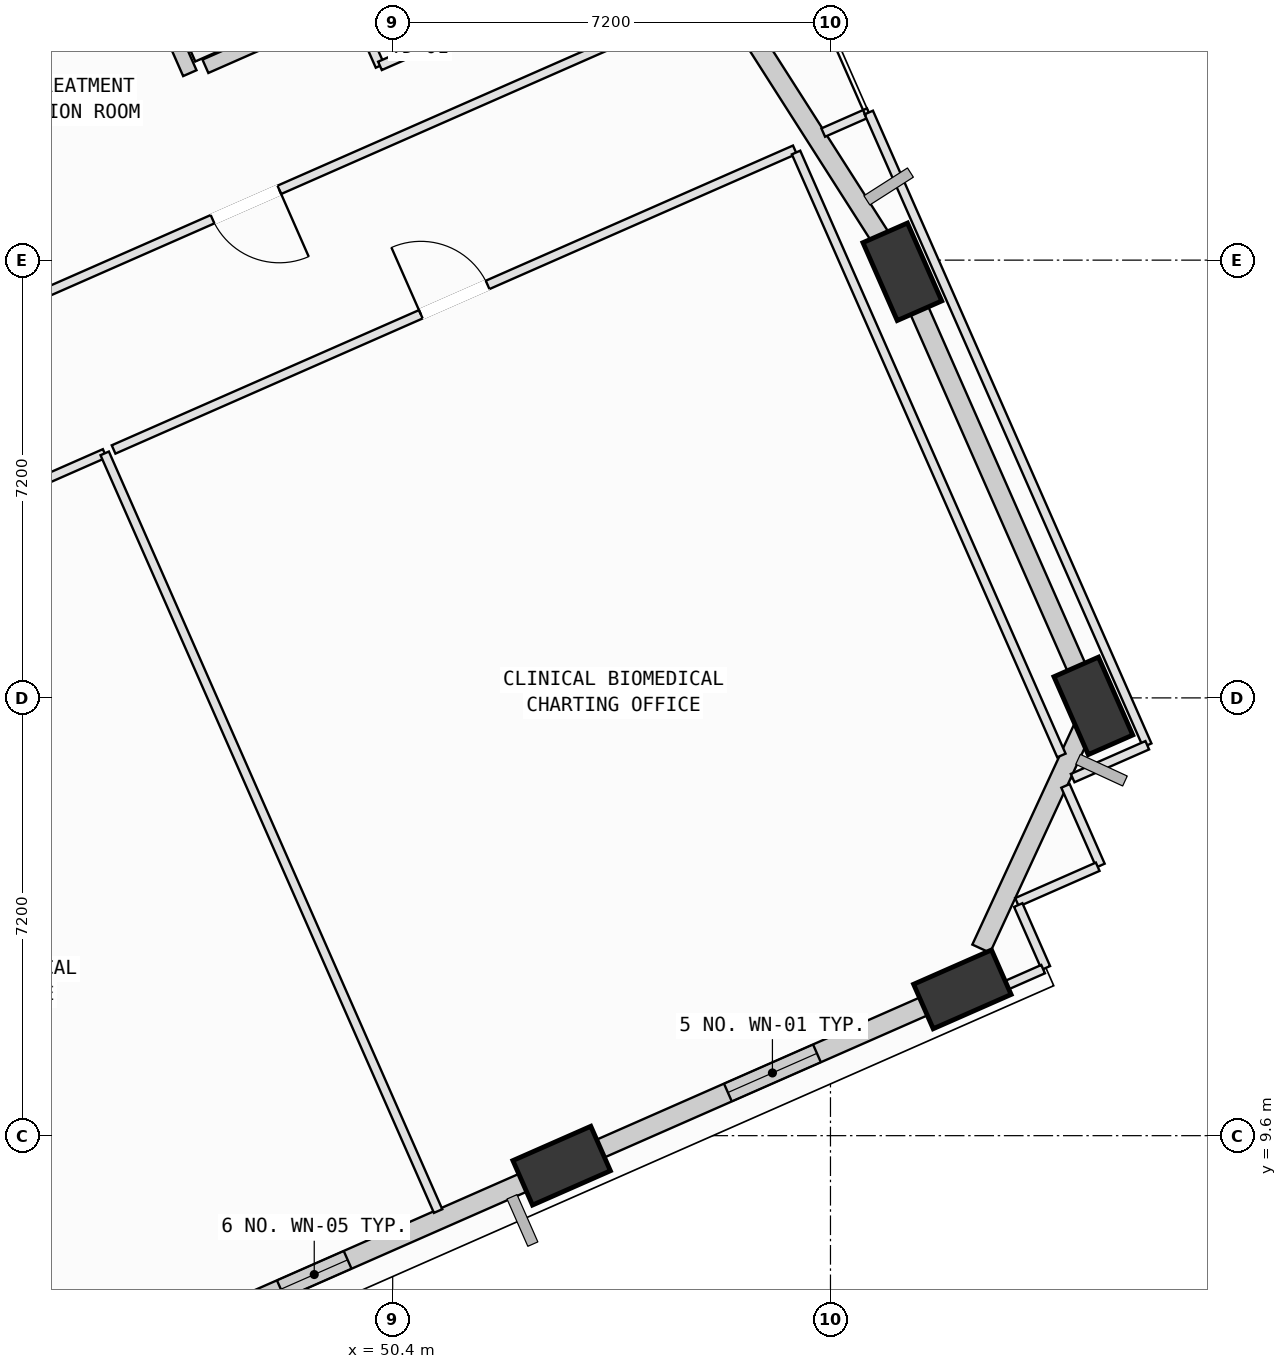
"""IFC4 building model, lengths in metres.
Left out: names, types, materials, properties, quantities, classifications, styles, units other than length and angle.
Written with IfcOpenShell. Run it as: python <this file> out.ifc"""

import sys

from ifc_helpers import new_model, si_unit, direction, frame, frame_2d, origin, origin_2d, place, context, subcontext, project, spatial, rectangle, extrude, element, fill, save


model = new_model("IFC4")
c1 = context("Model", 3, precision=1e-05, world=origin(), true_north=direction((0.0, 1.0)))
c2 = subcontext(c1, "Body", "Model", "MODEL_VIEW")
j1 = project(units=[si_unit("LENGTHUNIT", "METRE"), si_unit("PLANEANGLEUNIT", "RADIAN")], contexts=[c1])
p1 = place(None, origin())
s1 = spatial("IfcSite", under=j1, at=p1, CompositionType="ELEMENT")
p2 = place(p1, origin())
s2 = spatial("IfcBuilding", under=s1, at=p2, CompositionType="ELEMENT")
p3 = place(p2, frame((0.0, 0.0, 124.4)))
s3 = spatial("IfcBuildingStorey", under=s2, at=p3, CompositionType="ELEMENT", Elevation=124.4)
p4 = place(p3, frame((46.589, 6.207, 0.002), z_axis=(0.076271906054, 0.054254019298, 0.995609912434), x_axis=(-0.857296932846, 0.513440266916, 0.037696965954)))
e1 = element("IfcColumn", 1, at=p4, inside=s3, PredefinedType="COLUMN", context=c2, shape_type="SweptSolid", body=[
    extrude(rectangle(XDim=1.4, YDim=0.8, at=origin_2d()), origin(), (0.0, 0.0, 1.0), 4.014),
])
p5 = place(p3, frame((53.179, 9.106, 0.002), z_axis=(0.063984022053, 0.081240871306, 0.994638610628), x_axis=(-0.966927732484, 0.251626976768, 0.041648826096)))
e2 = element("IfcColumn", 2, at=p5, inside=s3, PredefinedType="COLUMN", context=c2, shape_type="SweptSolid", body=[
    extrude(rectangle(XDim=1.4, YDim=0.8, at=origin_2d()), origin(), (0.0, 0.0, 1.0), 4.018),
])
p6 = place(p3, frame((59.769, 12.006, 0.002), z_axis=(0.051734907432, 0.108139906156, 0.992788628082), x_axis=(-0.998243901982, 0.0343235746, 0.048280476198)))
e3 = element("IfcColumn", 3, at=p6, inside=s3, PredefinedType="COLUMN", context=c2, shape_type="SweptSolid", body=[
    extrude(rectangle(XDim=1.4, YDim=0.8, at=origin_2d()), origin(), (0.0, 0.0, 1.0), 4.025),
])
p7 = place(p3, frame((61.924, 16.669, 0.002), z_axis=(0.032503072865, 0.116853398154, 0.992617163661), x_axis=(0.144542702737, -0.983250966895, 0.111017760678)))
e4 = element("IfcColumn", 4, at=p7, inside=s3, PredefinedType="COLUMN", context=c2, shape_type="SweptSolid", body=[
    extrude(rectangle(XDim=1.4, YDim=0.8, at=origin_2d()), origin(), (0.0, 0.0, 1.0), 4.026),
])
p8 = place(p3, frame((58.782, 23.808, 0.002), z_axis=(0.003220286845, 0.103899820854, 0.99458255413), x_axis=(0.374351311084, -0.922392684735, 0.095146366388)))
e5 = element("IfcColumn", 5, at=p8, inside=s3, PredefinedType="COLUMN", context=c2, shape_type="SweptSolid", body=[
    extrude(rectangle(XDim=1.4, YDim=0.8, at=origin_2d()), origin(), (0.0, 0.0, 1.0), 4.018),
])
p9 = place(p3, frame((47.32, 27.188, 0.0), z_axis=(0.0, 0.0, 1.0), x_axis=(0.915306756623, 0.402757422378, 0.0)))
e6 = element("IfcWall", 6, at=p9, inside=s3, PredefinedType="SOLIDWALL", context=c2, shape_type="SweptSolid", body=[
    extrude(rectangle(XDim=6.96, YDim=0.24, at=frame_2d((3.48, 0.0))), origin(), (0.0, 0.0, 1.0), 2.945),
])
p10 = place(p9, frame((2.93, 0.0, 0.0)))
e7 = element("IfcOpeningElement", 7, at=p10, cuts=e6, PredefinedType="OPENING", context=c2, shape_type="SweptSolid", body=[
    extrude(rectangle(XDim=1.1, YDim=2.15, at=frame_2d((0.55, 1.075))), frame((0.0, 0.13, 0.0), z_axis=(0.0, -1.0, 0.0), x_axis=(1.0, 0.0, 0.0)), (0.0, 0.0, 1.0), 0.26),
])
p11 = place(p3, frame((46.057, 29.364, 0.0), z_axis=(0.0, 0.0, 1.0), x_axis=(0.402810607767, -0.915283351903, 0.0)))
e8 = element("IfcWall", 8, at=p11, inside=s3, PredefinedType="SOLIDWALL", context=c2, shape_type="SweptSolid", body=[
    extrude(rectangle(XDim=2.5, YDim=0.24, at=frame_2d((1.25, 0.0))), origin(), (0.0, 0.0, 1.0), 3.165),
])
p12 = place(p3, frame((52.902, 8.984, 0.0), z_axis=(0.0, 0.0, 1.0), x_axis=(-0.915310979882, -0.40274782446, 0.0)))
e9 = element("IfcWall", 9, at=p12, inside=s3, PredefinedType="SOLIDWALL", context=c2, shape_type="SweptSolid", body=[
    extrude(rectangle(XDim=6.218, YDim=0.32, at=frame_2d((3.109, 0.0))), origin(), (0.0, 0.0, 1.0), 3.165),
])
p13 = place(p12, frame((3.542, 0.0, 0.75)))
e10 = element("IfcOpeningElement", 10, at=p13, cuts=e9, PredefinedType="OPENING", context=c2, shape_type="SweptSolid", body=[
    extrude(rectangle(XDim=1.2, YDim=1.75, at=frame_2d((0.6, 0.875))), frame((0.0, 0.17, 0.0), z_axis=(0.0, -1.0, 0.0), x_axis=(1.0, 0.0, 0.0)), (0.0, 0.0, 1.0), 0.34),
])
p14 = place(p3, frame((59.506, 11.89, 0.0), z_axis=(0.0, 0.0, 1.0), x_axis=(-0.915325989122, -0.402713711758, 0.0)))
e11 = element("IfcWall", 11, at=p14, inside=s3, PredefinedType="SOLIDWALL", context=c2, shape_type="SweptSolid", body=[
    extrude(rectangle(XDim=6.242, YDim=0.32, at=frame_2d((3.121, 0.0))), origin(), (0.0, 0.0, 1.0), 3.165),
])
p15 = place(p14, frame((2.325, 0.0, 0.75)))
e12 = element("IfcOpeningElement", 12, at=p15, cuts=e11, PredefinedType="OPENING", context=c2, shape_type="SweptSolid", body=[
    extrude(rectangle(XDim=1.6, YDim=1.95, at=frame_2d((0.8, 0.975))), frame((0.0, 0.17, 0.0), z_axis=(0.0, -1.0, 0.0), x_axis=(1.0, 0.0, 0.0)), (0.0, 0.0, 1.0), 0.34),
])
p16 = place(p3, frame((61.817, 16.438, 0.0), z_axis=(0.0, 0.0, 1.0), x_axis=(-0.419461505916, -0.907773124219, 0.0)))
e13 = element("IfcWall", 13, at=p16, inside=s3, PredefinedType="SOLIDWALL", context=c2, shape_type="SweptSolid", body=[
    extrude(rectangle(XDim=4.145, YDim=0.32, at=frame_2d((2.073, 0.0))), origin(), (0.0, 0.0, 1.0), 3.165),
])
p17 = place(p3, frame((58.903, 23.534, 0.0), z_axis=(0.0, 0.0, 1.0), x_axis=(0.402727848823, -0.915319769142, 0.0)))
e14 = element("IfcWall", 14, at=p17, inside=s3, PredefinedType="SOLIDWALL", context=c2, shape_type="SweptSolid", body=[
    extrude(rectangle(XDim=6.84, YDim=0.32, at=frame_2d((3.42, 0.0))), origin(), (0.0, 0.0, 1.0), 3.165),
])
p18 = place(p3, frame((53.676, 31.81, 0.0), z_axis=(0.0, 0.0, 1.0), x_axis=(0.537911832646, -0.84300110338, 0.0)))
e15 = element("IfcWall", 15, at=p18, inside=s3, PredefinedType="SOLIDWALL", context=c2, shape_type="SweptSolid", body=[
    extrude(rectangle(XDim=8.838, YDim=0.32, at=frame_2d((4.419, 0.0))), origin(), (0.0, 0.0, 1.0), 3.165),
])
p19 = place(p3, frame((41.56, 26.828, 0.0), z_axis=(0.0, 0.0, 1.0), x_axis=(0.915304479766, 0.402762596726, 0.0)))
e16 = element("IfcWall", 16, at=p19, inside=s3, PredefinedType="SOLIDWALL", context=c2, shape_type="SweptSolid", body=[
    extrude(rectangle(XDim=5.117, YDim=0.32, at=frame_2d((2.559, 0.0))), origin(), (0.0, 0.0, 1.0), 3.145),
])
p20 = place(p19, frame((2.034, 0.0, 0.75)))
e17 = element("IfcOpeningElement", 17, at=p20, cuts=e16, PredefinedType="OPENING", context=c2, shape_type="SweptSolid", body=[
    extrude(rectangle(XDim=1.2, YDim=1.75, at=frame_2d((0.6, 0.875))), frame((0.0, 0.17, 0.0), z_axis=(0.0, -1.0, 0.0), x_axis=(1.0, 0.0, 0.0)), (0.0, 0.0, 1.0), 0.34),
])
p21 = place(p3, frame((36.5, 16.79, 0.0), z_axis=(0.0, 0.0, 1.0), x_axis=(0.915322583173, 0.402721453034, 0.0)))
e18 = element("IfcWall", 18, at=p21, inside=s3, PredefinedType="PARTITIONING", context=c2, shape_type="SweptSolid", body=[
    extrude(rectangle(XDim=10.012, YDim=0.15, at=frame_2d((5.006, 0.0))), origin(), (0.0, 0.0, 1.0), 2.965),
])
p22 = place(p21, frame((4.406, 0.0, 0.0)))
e19 = element("IfcOpeningElement", 19, at=p22, cuts=e18, PredefinedType="OPENING", context=c2, shape_type="SweptSolid", body=[
    extrude(rectangle(XDim=1.2, YDim=2.15, at=frame_2d((0.6, 1.075))), frame((0.0, 0.085, 0.0), z_axis=(0.0, -1.0, 0.0), x_axis=(1.0, 0.0, 0.0)), (0.0, 0.0, 1.0), 0.17),
])
p23 = place(p3, frame((45.664, 20.822, 0.0), z_axis=(0.0, 0.0, 1.0), x_axis=(0.402718182195, -0.915324022262, 0.0)))
e20 = element("IfcWall", 20, at=p23, inside=s3, PredefinedType="PARTITIONING", context=c2, shape_type="SweptSolid", body=[
    extrude(rectangle(XDim=13.615, YDim=0.15, at=frame_2d((6.807, 0.0))), origin(), (0.0, 0.0, 1.0), 3.78),
])
p24 = place(p3, frame((45.81, 20.886, 0.0), z_axis=(0.0, 0.0, 1.0), x_axis=(0.915307973906, 0.402754655969, 0.0)))
e21 = element("IfcWall", 21, at=p24, inside=s3, PredefinedType="PARTITIONING", context=c2, shape_type="SweptSolid", body=[
    extrude(rectangle(XDim=12.24, YDim=0.15, at=frame_2d((6.12, 0.0))), origin(), (0.0, 0.0, 1.0), 3.78),
])
p25 = place(p24, frame((5.52, 0.0, 0.0)))
e22 = element("IfcOpeningElement", 22, at=p25, cuts=e21, PredefinedType="OPENING", context=c2, shape_type="SweptSolid", body=[
    extrude(rectangle(XDim=1.2, YDim=2.15, at=frame_2d((0.6, 1.075))), frame((0.0, 0.085, 0.0), z_axis=(0.0, -1.0, 0.0), x_axis=(1.0, 0.0, 0.0)), (0.0, 0.0, 1.0), 0.17),
])
p26 = place(p3, frame((57.034, 25.77, 0.0), z_axis=(0.0, 0.0, 1.0), x_axis=(0.402780146141, -0.915296757273, 0.0)))
e23 = element("IfcWall", 23, at=p26, inside=s3, PredefinedType="PARTITIONING", context=c2, shape_type="SweptSolid", body=[
    extrude(rectangle(XDim=10.835, YDim=0.15, at=frame_2d((5.417, 0.0))), origin(), (0.0, 0.0, 1.0), 3.78),
])
p27 = place(p3, frame((61.465, 15.353, 0.0), z_axis=(0.0, 0.0, 1.0), x_axis=(0.402447017593, -0.915443279527, 0.0)))
e24 = element("IfcWall", 24, at=p27, inside=s3, PredefinedType="PARTITIONING", context=c2, shape_type="SweptSolid", body=[
    extrude(rectangle(XDim=1.431, YDim=0.15, at=frame_2d((0.716, 0.0))), origin(), (0.0, 0.0, 1.0), 3.78),
])
p28 = place(p3, frame((61.995, 14.023, 0.0), z_axis=(0.0, 0.0, 1.0), x_axis=(-0.915305100978, -0.402761184978, 0.0)))
e25 = element("IfcWall", 25, at=p28, inside=s3, PredefinedType="PARTITIONING", context=c2, shape_type="SweptSolid", body=[
    extrude(rectangle(XDim=1.45, YDim=0.15, at=frame_2d((0.725, 0.0))), origin(), (0.0, 0.0, 1.0), 3.78),
])
p29 = place(p3, frame((60.688, 13.393, 0.0), z_axis=(0.0, 0.0, 1.0), x_axis=(0.402767578813, -0.915302287475, 0.0)))
e26 = element("IfcWall", 26, at=p29, inside=s3, PredefinedType="PARTITIONING", context=c2, shape_type="SweptSolid", body=[
    extrude(rectangle(XDim=1.13, YDim=0.15, at=frame_2d((0.565, 0.0))), origin(), (0.0, 0.0, 1.0), 3.78),
])
p30 = place(p3, frame((61.097, 12.339, 0.0), z_axis=(0.0, 0.0, 1.0), x_axis=(-0.915061929337, -0.403313358913, 0.0)))
e27 = element("IfcWall", 27, at=p30, inside=s3, PredefinedType="PARTITIONING", context=c2, shape_type="SweptSolid", body=[
    extrude(rectangle(XDim=1.637, YDim=0.15, at=frame_2d((0.818, 0.0))), origin(), (0.0, 0.0, 1.0), 3.78),
])
p31 = place(p3, frame((53.885, 9.165, 0.0), z_axis=(0.0, 0.0, 1.0), x_axis=(-0.915315032423, -0.402738614266, 0.0)))
e28 = element("IfcWall", 28, at=p31, inside=s3, PredefinedType="PARTITIONING", context=c2, shape_type="SweptSolid", body=[
    extrude(rectangle(XDim=0.974, YDim=0.15, at=frame_2d((0.487, 0.0))), origin(), (0.0, 0.0, 1.0), 3.165),
])
p32 = place(p3, frame((49.766, 28.16, 0.0), z_axis=(0.0, 0.0, 1.0), x_axis=(0.402955906801, -0.915219392918, 0.0)))
e29 = element("IfcWall", 29, at=p32, inside=s3, PredefinedType="PARTITIONING", context=c2, shape_type="SweptSolid", body=[
    extrude(rectangle(XDim=1.054, YDim=0.15, at=frame_2d((0.527, 0.0))), origin(), (0.0, 0.0, 1.0), 3.78),
])
p33 = place(p3, frame((50.191, 27.195, 0.0), z_axis=(0.0, 0.0, 1.0), x_axis=(0.915503423678, 0.402310180377, 0.0)))
e30 = element("IfcWall", 30, at=p33, inside=s3, PredefinedType="PARTITIONING", context=c2, shape_type="SweptSolid", body=[
    extrude(rectangle(XDim=1.7, YDim=0.15, at=frame_2d((0.85, 0.0))), origin(), (0.0, 0.0, 1.0), 3.78),
])
p34 = place(p3, frame((55.739, 28.326, 0.0), z_axis=(0.0, 0.0, 1.0), x_axis=(-0.915298880847, -0.402775320396, 0.0)))
e31 = element("IfcWall", 31, at=p34, inside=s3, PredefinedType="PARTITIONING", context=c2, shape_type="SweptSolid", body=[
    extrude(rectangle(XDim=16.94, YDim=0.15, at=frame_2d((8.47, 0.0))), origin(), (0.0, 0.0, 1.0), 2.945),
])
p35 = place(p34, frame((7.87, 0.0, 0.0)))
e32 = element("IfcOpeningElement", 32, at=p35, cuts=e31, PredefinedType="OPENING", context=c2, shape_type="SweptSolid", body=[
    extrude(rectangle(XDim=1.2, YDim=2.15, at=frame_2d((0.6, 1.075))), frame((0.0, 0.085, 0.0), z_axis=(0.0, -1.0, 0.0), x_axis=(1.0, 0.0, 0.0)), (0.0, 0.0, 1.0), 0.17),
])
p36 = place(p3, frame((57.481, 26.098, 0.0), z_axis=(0.0, 0.0, 1.0), x_axis=(0.915086186066, 0.403258319283, 0.0)))
e33 = element("IfcWall", 33, at=p36, inside=s3, PredefinedType="PARTITIONING", context=c2, shape_type="SweptSolid", body=[
    extrude(rectangle(XDim=0.819, YDim=0.15, at=frame_2d((0.409, 0.0))), origin(), (0.0, 0.0, 1.0), 3.78),
])
p37 = place(p3, frame((58.23, 26.428, 0.0), z_axis=(0.0, 0.0, 1.0), x_axis=(0.402812728397, -0.915282418624, 0.0)))
e34 = element("IfcWall", 34, at=p37, inside=s3, PredefinedType="PARTITIONING", context=c2, shape_type="SweptSolid", body=[
    extrude(rectangle(XDim=11.37, YDim=0.15, at=frame_2d((5.685, 0.0))), origin(), (0.0, 0.0, 1.0), 3.165),
])
p38 = place(p3, frame((62.81, 16.021, 0.0), z_axis=(0.0, 0.0, 1.0), x_axis=(-0.915277434987, -0.402824052167, 0.0)))
e35 = element("IfcWall", 35, at=p38, inside=s3, PredefinedType="PARTITIONING", context=c2, shape_type="SweptSolid", body=[
    extrude(rectangle(XDim=1.341, YDim=0.15, at=frame_2d((0.67, 0.0))), origin(), (0.0, 0.0, 1.0), 3.78),
])
p39 = place(p13, origin())
e36 = element("IfcWindow", 36, at=p39, inside=s3, PartitioningType="SINGLE_PANEL", PredefinedType="WINDOW", context=c2, shape_type="SweptSolid", body=[
    extrude(rectangle(XDim=1.2, YDim=1.75, at=frame_2d((0.6, 0.875))), frame((0.0, 0.03, 0.0), z_axis=(0.0, -1.0, 0.0), x_axis=(1.0, 0.0, 0.0)), (0.0, 0.0, 1.0), 0.06),
])
fill(e10, e36)
p40 = place(p15, origin())
e37 = element("IfcWindow", 37, at=p40, inside=s3, PartitioningType="SINGLE_PANEL", PredefinedType="WINDOW", context=c2, shape_type="SweptSolid", body=[
    extrude(rectangle(XDim=1.6, YDim=1.95, at=frame_2d((0.8, 0.975))), frame((0.0, 0.03, 0.0), z_axis=(0.0, -1.0, 0.0), x_axis=(1.0, 0.0, 0.0)), (0.0, 0.0, 1.0), 0.06),
])
fill(e12, e37)
p41 = place(p25, origin())
e38 = element("IfcDoor", 38, at=p41, inside=s3, OperationType="SINGLE_SWING_LEFT", PredefinedType="DOOR", context=c2, shape_type="SweptSolid", body=[
    extrude(rectangle(XDim=1.2, YDim=2.15, at=frame_2d((0.6, 1.075))), frame((0.0, 0.025, 0.0), z_axis=(0.0, -1.0, 0.0), x_axis=(1.0, 0.0, 0.0)), (0.0, 0.0, 1.0), 0.05),
])
fill(e22, e38)
p42 = place(p35, origin())
e39 = element("IfcDoor", 39, at=p42, inside=s3, OperationType="SINGLE_SWING_LEFT", PredefinedType="DOOR", context=c2, shape_type="SweptSolid", body=[
    extrude(rectangle(XDim=1.2, YDim=2.15, at=frame_2d((0.6, 1.075))), frame((0.0, 0.025, 0.0), z_axis=(0.0, -1.0, 0.0), x_axis=(1.0, 0.0, 0.0)), (0.0, 0.0, 1.0), 0.05),
])
fill(e32, e39)
save(model, sys.argv[1])
